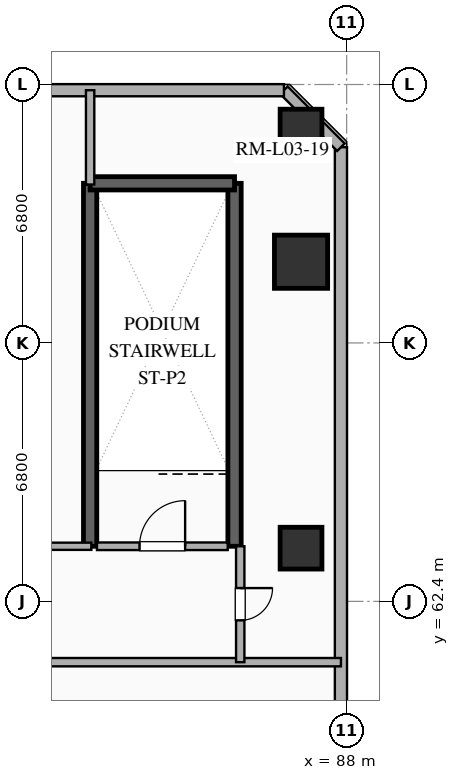
"""IFC4 building model, lengths in metres.
Left out: names, types, materials, properties, quantities, classifications, styles, units other than length and angle.
Written with IfcOpenShell. Run it as: python <this file> out.ifc"""

import sys

from ifc_helpers import new_model, si_unit, direction, frame, frame_2d, origin, origin_2d, place, context, subcontext, project, spatial, rectangle, extrude, element, fill, save


model = new_model("IFC4")
c1 = context("Model", 3, precision=1e-05, world=origin(), true_north=direction((0.0, 1.0)))
c2 = subcontext(c1, "Body", "Model", "MODEL_VIEW")
j1 = project(units=[si_unit("LENGTHUNIT", "METRE"), si_unit("PLANEANGLEUNIT", "RADIAN")], contexts=[c1])
p1 = place(None, origin())
s1 = spatial("IfcSite", under=j1, at=p1, CompositionType="ELEMENT")
p2 = place(p1, origin())
s2 = spatial("IfcBuilding", under=s1, at=p2, CompositionType="ELEMENT")
p3 = place(p2, frame((0.0, 0.0, 16.8)))
s3 = spatial("IfcBuildingStorey", under=s2, at=p3, CompositionType="ELEMENT", Elevation=16.8)
for number, where, z_axis, x_axis in (
    (1, (86.8, 74.8, 0.0), (0.0, 0.0, 1.0), (1.0, 0.0, 0.0)),
    (2, (86.8, 63.8, 0.0), (0.0, 0.0, 1.0), (1.0, 0.0, 0.0)),
):
    element("IfcColumn", number, at=place(p3, frame(where, z_axis=z_axis, x_axis=x_axis)), inside=s3, PredefinedType="COLUMN", context=c2, shape_type="SweptSolid", body=[
        extrude(rectangle(XDim=1.1, YDim=1.1, at=origin_2d()), origin(), (0.0, 0.0, 1.0), 5.05),
    ])
p4 = place(p3, frame((86.8, 71.337, 0.0), z_axis=(0.0, 0.0, 1.0), x_axis=(1.0, 0.0, 0.0)))
e3 = element("IfcColumn", 3, at=p4, inside=s3, PredefinedType="COLUMN", context=c2, shape_type="SweptSolid", body=[
    extrude(rectangle(XDim=1.4, YDim=1.4, at=origin_2d()), origin(), (0.0, 0.0, 1.0), 5.05),
])
for number, where, z_axis, x_axis in (
    (4, (81.25, 63.85, 0.0), (0.0, 0.0, 1.0), (0.0, 1.0, 0.0)),
    (5, (85.05, 63.85, 0.0), (0.0, 0.0, 1.0), (0.0, 1.0, 0.0)),
):
    element("IfcWall", number, at=place(p3, frame(where, z_axis=z_axis, x_axis=x_axis)), inside=s3, PredefinedType="SHEAR", context=c2, shape_type="SweptSolid", body=[
        extrude(rectangle(XDim=9.55, YDim=0.35, at=frame_2d((4.775, 0.0))), origin(), (0.0, 0.0, 1.0), 5.05),
    ])
p5 = place(p3, frame((81.25, 73.4, 0.0), z_axis=(0.0, 0.0, 1.0), x_axis=(1.0, 0.0, 0.0)))
e6 = element("IfcWall", 6, at=p5, inside=s3, PredefinedType="SHEAR", context=c2, shape_type="SweptSolid", body=[
    extrude(rectangle(XDim=3.8, YDim=0.35, at=frame_2d((1.9, 0.0))), origin(), (0.0, 0.0, 1.0), 5.05),
])
p6 = place(p3, frame((87.85, 9.65, 0.0), z_axis=(0.0, 0.0, 1.0), x_axis=(0.0, 1.0, 0.0)))
e7 = element("IfcWall", 7, at=p6, inside=s3, PredefinedType="SOLIDWALL", context=c2, shape_type="SweptSolid", body=[
    extrude(rectangle(XDim=64.7, YDim=0.32, at=frame_2d((32.35, 0.0))), origin(), (0.0, 0.0, 1.0), 5.05),
])
p7 = place(p6, frame((2.275, 0.0, 0.9)))
e8 = element("IfcOpeningElement", 8, at=p7, cuts=e7, PredefinedType="OPENING", context=c2, shape_type="SweptSolid", body=[
    extrude(rectangle(XDim=3.2, YDim=3.95, at=frame_2d((1.6, 1.975))), frame((0.0, 0.17, 0.0), z_axis=(0.0, -1.0, 0.0), x_axis=(1.0, 0.0, 0.0)), (0.0, 0.0, 1.0), 0.34),
])
p8 = place(p6, frame((13.75, 0.0, 0.9)))
e9 = element("IfcOpeningElement", 9, at=p8, cuts=e7, PredefinedType="OPENING", context=c2, shape_type="SweptSolid", body=[
    extrude(rectangle(XDim=3.2, YDim=3.95, at=frame_2d((1.6, 1.975))), frame((0.0, 0.17, 0.0), z_axis=(0.0, -1.0, 0.0), x_axis=(1.0, 0.0, 0.0)), (0.0, 0.0, 1.0), 0.34),
])
p9 = place(p6, frame((29.65, 0.0, 0.9)))
e10 = element("IfcOpeningElement", 10, at=p9, cuts=e7, PredefinedType="OPENING", context=c2, shape_type="SweptSolid", body=[
    extrude(rectangle(XDim=3.2, YDim=3.95, at=frame_2d((1.6, 1.975))), frame((0.0, 0.17, 0.0), z_axis=(0.0, -1.0, 0.0), x_axis=(1.0, 0.0, 0.0)), (0.0, 0.0, 1.0), 0.34),
])
p10 = place(p6, frame((44.175, 0.0, 0.9)))
e11 = element("IfcOpeningElement", 11, at=p10, cuts=e7, PredefinedType="OPENING", context=c2, shape_type="SweptSolid", body=[
    extrude(rectangle(XDim=3.2, YDim=3.95, at=frame_2d((1.6, 1.975))), frame((0.0, 0.17, 0.0), z_axis=(0.0, -1.0, 0.0), x_axis=(1.0, 0.0, 0.0)), (0.0, 0.0, 1.0), 0.34),
])
p11 = place(p3, frame((87.85, 74.35, 0.0), z_axis=(0.0, 0.0, 1.0), x_axis=(-0.707106781187, 0.707106781187, 0.0)))
e12 = element("IfcWall", 12, at=p11, inside=s3, PredefinedType="SOLIDWALL", context=c2, shape_type="SweptSolid", body=[
    extrude(rectangle(XDim=2.121, YDim=0.28, at=frame_2d((1.061, 0.0))), origin(), (0.0, 0.0, 1.0), 5.05),
])
p12 = place(p3, frame((86.35, 75.85, 0.0), z_axis=(0.0, 0.0, 1.0), x_axis=(-1.0, 0.0, 0.0)))
e13 = element("IfcWall", 13, at=p12, inside=s3, PredefinedType="SOLIDWALL", context=c2, shape_type="SweptSolid", body=[
    extrude(rectangle(XDim=76.7, YDim=0.32, at=frame_2d((38.35, 0.0))), origin(), (0.0, 0.0, 1.0), 5.05),
])
p13 = place(p12, frame((13.75, 0.0, 0.9)))
e14 = element("IfcOpeningElement", 14, at=p13, cuts=e13, PredefinedType="OPENING", context=c2, shape_type="SweptSolid", body=[
    extrude(rectangle(XDim=3.2, YDim=3.95, at=frame_2d((1.6, 1.975))), frame((0.0, 0.17, 0.0), z_axis=(0.0, -1.0, 0.0), x_axis=(1.0, 0.0, 0.0)), (0.0, 0.0, 1.0), 0.34),
])
p14 = place(p12, frame((24.75, 0.0, 0.9)))
e15 = element("IfcOpeningElement", 15, at=p14, cuts=e13, PredefinedType="OPENING", context=c2, shape_type="SweptSolid", body=[
    extrude(rectangle(XDim=3.2, YDim=3.95, at=frame_2d((1.6, 1.975))), frame((0.0, 0.17, 0.0), z_axis=(0.0, -1.0, 0.0), x_axis=(1.0, 0.0, 0.0)), (0.0, 0.0, 1.0), 0.34),
])
p15 = place(p12, frame((36.875, 0.0, 0.9)))
e16 = element("IfcOpeningElement", 16, at=p15, cuts=e13, PredefinedType="OPENING", context=c2, shape_type="SweptSolid", body=[
    extrude(rectangle(XDim=3.2, YDim=3.95, at=frame_2d((1.6, 1.975))), frame((0.0, 0.17, 0.0), z_axis=(0.0, -1.0, 0.0), x_axis=(1.0, 0.0, 0.0)), (0.0, 0.0, 1.0), 0.34),
])
p16 = place(p12, frame((48.75, 0.0, 0.9)))
e17 = element("IfcOpeningElement", 17, at=p16, cuts=e13, PredefinedType="OPENING", context=c2, shape_type="SweptSolid", body=[
    extrude(rectangle(XDim=3.2, YDim=3.95, at=frame_2d((1.6, 1.975))), frame((0.0, 0.17, 0.0), z_axis=(0.0, -1.0, 0.0), x_axis=(1.0, 0.0, 0.0)), (0.0, 0.0, 1.0), 0.34),
])
p17 = place(p3, frame((81.43, 63.85, 0.0), z_axis=(0.0, 0.0, 1.0), x_axis=(1.0, 0.0, 0.0)))
e18 = element("IfcWall", 18, at=p17, inside=s3, PredefinedType="SOLIDWALL", context=c2, shape_type="SweptSolid", body=[
    extrude(rectangle(XDim=3.44, YDim=0.2, at=frame_2d((1.72, 0.0))), origin(), (0.0, 0.0, 1.0), 3.65),
])
p18 = place(p17, frame((1.12, 0.0, 0.0)))
e19 = element("IfcOpeningElement", 19, at=p18, cuts=e18, PredefinedType="OPENING", context=c2, shape_type="SweptSolid", body=[
    extrude(rectangle(XDim=1.2, YDim=2.15, at=frame_2d((0.6, 1.075))), frame((0.0, 0.11, 0.0), z_axis=(0.0, -1.0, 0.0), x_axis=(1.0, 0.0, 0.0)), (0.0, 0.0, 1.0), 0.22),
])
p19 = place(p3, frame((40.768, 63.85, 0.0), z_axis=(0.0, 0.0, 1.0), x_axis=(1.0, 0.0, 0.0)))
e20 = element("IfcWall", 20, at=p19, inside=s3, PredefinedType="PARTITIONING", context=c2, shape_type="SweptSolid", body=[
    extrude(rectangle(XDim=40.514, YDim=0.19, at=frame_2d((20.257, 0.0))), origin(), (0.0, 0.0, 1.0), 3.65),
])
p20 = place(p19, frame((27.107, 0.0, 0.0)))
e21 = element("IfcOpeningElement", 21, at=p20, cuts=e20, PredefinedType="OPENING", context=c2, shape_type="SweptSolid", body=[
    extrude(rectangle(XDim=1.0, YDim=2.2, at=frame_2d((0.5, 1.1))), frame((0.0, 0.105, 0.0), z_axis=(0.0, -1.0, 0.0), x_axis=(1.0, 0.0, 0.0)), (0.0, 0.0, 1.0), 0.21),
])
p21 = place(p19, frame((8.532, 0.0, 0.0)))
e22 = element("IfcOpeningElement", 22, at=p21, cuts=e20, PredefinedType="OPENING", context=c2, shape_type="SweptSolid", body=[
    extrude(rectangle(XDim=1.1, YDim=2.2, at=frame_2d((0.55, 1.1))), frame((0.0, 0.105, 0.0), z_axis=(0.0, -1.0, 0.0), x_axis=(1.0, 0.0, 0.0)), (0.0, 0.0, 1.0), 0.21),
])
p22 = place(p19, frame((3.982, 0.0, 0.0)))
e23 = element("IfcOpeningElement", 23, at=p22, cuts=e20, PredefinedType="OPENING", context=c2, shape_type="SweptSolid", body=[
    extrude(rectangle(XDim=0.9, YDim=2.1, at=frame_2d((0.45, 1.05))), frame((0.0, 0.105, 0.0), z_axis=(0.0, -1.0, 0.0), x_axis=(1.0, 0.0, 0.0)), (0.0, 0.0, 1.0), 0.21),
])
p23 = place(p3, frame((87.85, 60.8, 0.0), z_axis=(0.0, 0.0, 1.0), x_axis=(-1.0, 0.0, 0.0)))
e24 = element("IfcWall", 24, at=p23, inside=s3, PredefinedType="SOLIDWALL", context=c2, shape_type="SweptSolid", body=[
    extrude(rectangle(XDim=21.85, YDim=0.22, at=frame_2d((10.925, 0.0))), origin(), (0.0, 0.0, 1.0), 3.65),
])
p24 = place(p3, frame((85.2, 63.85, 0.0), z_axis=(0.0, 0.0, 1.0), x_axis=(0.0, -1.0, 0.0)))
e25 = element("IfcWall", 25, at=p24, inside=s3, PredefinedType="SOLIDWALL", context=c2, shape_type="SweptSolid", body=[
    extrude(rectangle(XDim=3.05, YDim=0.22, at=frame_2d((1.525, 0.0))), origin(), (0.0, 0.0, 1.0), 3.65),
])
p25 = place(p24, frame((1.1, 0.0, 0.0)))
e26 = element("IfcOpeningElement", 26, at=p25, cuts=e25, PredefinedType="OPENING", context=c2, shape_type="SweptSolid", body=[
    extrude(rectangle(XDim=0.85, YDim=2.15, at=frame_2d((0.425, 1.075))), frame((0.0, 0.12, 0.0), z_axis=(0.0, -1.0, 0.0), x_axis=(1.0, 0.0, 0.0)), (0.0, 0.0, 1.0), 0.24),
])
p26 = place(p3, frame((81.25, 75.85, 0.0), z_axis=(0.0, 0.0, 1.0), x_axis=(0.0, -1.0, 0.0)))
e27 = element("IfcWall", 27, at=p26, inside=s3, PredefinedType="SOLIDWALL", context=c2, shape_type="SweptSolid", body=[
    extrude(rectangle(XDim=2.482, YDim=0.22, at=frame_2d((1.241, 0.0))), origin(), (0.0, 0.0, 1.0), 3.65),
])
p27 = place(p18, origin())
e28 = element("IfcDoor", 28, at=p27, inside=s3, OperationType="SINGLE_SWING_RIGHT", PredefinedType="DOOR", context=c2, shape_type="SweptSolid", body=[
    extrude(rectangle(XDim=1.2, YDim=2.15, at=frame_2d((0.6, 1.075))), frame((0.0, 0.025, 0.0), z_axis=(0.0, -1.0, 0.0), x_axis=(1.0, 0.0, 0.0)), (0.0, 0.0, 1.0), 0.05),
])
fill(e19, e28)
p28 = place(p25, origin())
e29 = element("IfcDoor", 29, at=p28, inside=s3, OperationType="SINGLE_SWING_LEFT", PredefinedType="DOOR", context=c2, shape_type="SweptSolid", body=[
    extrude(rectangle(XDim=0.85, YDim=2.15, at=frame_2d((0.425, 1.075))), frame((0.0, 0.025, 0.0), z_axis=(0.0, -1.0, 0.0), x_axis=(1.0, 0.0, 0.0)), (0.0, 0.0, 1.0), 0.05),
])
fill(e26, e29)
save(model, sys.argv[1])
